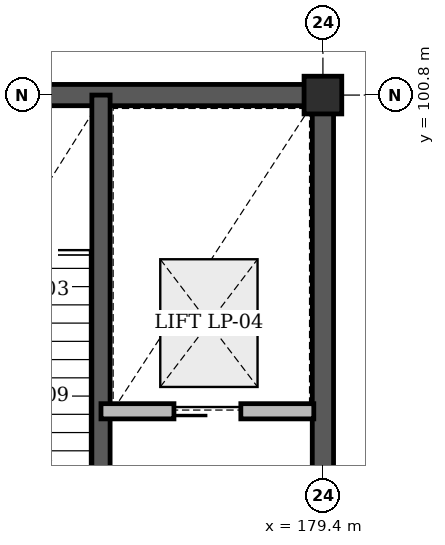
"""IFC4 building model, lengths in metres.
Left out: names, types, materials, properties, quantities, classifications, styles, units other than length and angle.
Written with IfcOpenShell. Run it as: python <this file> out.ifc"""

import sys

from ifc_helpers import new_model, si_unit, direction, frame, frame_2d, origin, origin_2d, place, context, subcontext, project, spatial, rectangle, extrude, element, fill, save


model = new_model("IFC4")
c1 = context("Model", 3, precision=1e-05, world=origin(), true_north=direction((0.0, 1.0)))
c2 = subcontext(c1, "Body", "Model", "MODEL_VIEW")
j1 = project(units=[si_unit("LENGTHUNIT", "METRE"), si_unit("PLANEANGLEUNIT", "RADIAN")], contexts=[c1])
p1 = place(None, origin())
s1 = spatial("IfcSite", under=j1, at=p1, CompositionType="ELEMENT")
p2 = place(p1, origin())
s2 = spatial("IfcBuilding", under=s1, at=p2, CompositionType="ELEMENT")
p3 = place(p2, frame((0.0, 0.0, 9.6)))
s3 = spatial("IfcBuildingStorey", under=s2, at=p3, CompositionType="ELEMENT", Elevation=9.6)
p4 = place(p3, frame((171.425, 100.8, 0.0), z_axis=(0.0, 0.0, 1.0), x_axis=(1.0, 0.0, 0.0)))
e1 = element("IfcWall", 1, at=p4, inside=s3, PredefinedType="SHEAR", context=c2, shape_type="SweptSolid", body=[
    extrude(rectangle(XDim=8.15, YDim=0.35, at=frame_2d((4.075, 0.0))), origin(), (0.0, 0.0, 1.0), 4.48),
])
p5 = place(p3, frame((179.4, 92.4, 0.0), z_axis=(0.0, 0.0, 1.0), x_axis=(0.0, 1.0, 0.0)))
e2 = element("IfcWall", 2, at=p5, inside=s3, PredefinedType="SHEAR", context=c2, shape_type="SweptSolid", body=[
    extrude(rectangle(XDim=8.4, YDim=0.35, at=frame_2d((4.2, 0.0))), origin(), (0.0, 0.0, 1.0), 4.48),
])
p6 = place(p3, frame((179.4, 100.8, 0.0), z_axis=(0.0, 0.0, 1.0), x_axis=(1.0, 0.0, 0.0)))
e3 = element("IfcColumn", 3, at=p6, inside=s3, PredefinedType="COLUMN", context=c2, shape_type="SweptSolid", body=[
    extrude(rectangle(XDim=0.62, YDim=0.62, at=origin_2d()), origin(), (0.0, 0.0, 1.0), 4.8),
])
p7 = place(p3, frame((175.75, 92.4, 0.0), z_axis=(0.0, 0.0, 1.0), x_axis=(0.0, 1.0, 0.0)))
e4 = element("IfcWall", 4, at=p7, inside=s3, PredefinedType="SHEAR", context=c2, shape_type="SweptSolid", body=[
    extrude(rectangle(XDim=8.4, YDim=0.3, at=frame_2d((4.2, 0.0))), origin(), (0.0, 0.0, 1.0), 4.8),
])
p8 = place(p3, frame((175.75, 95.6, 0.0), z_axis=(0.0, 0.0, 1.0), x_axis=(1.0, 0.0, 0.0)))
e5 = element("IfcWall", 5, at=p8, inside=s3, PredefinedType="STANDARD", context=c2, shape_type="SweptSolid", body=[
    extrude(rectangle(XDim=3.5, YDim=0.25, at=frame_2d((1.75, 0.0))), origin(), (0.0, 0.0, 1.0), 4.46),
])
p9 = place(p8, frame((1.2, 0.0, 0.0)))
e6 = element("IfcOpeningElement", 6, at=p9, cuts=e5, PredefinedType="OPENING", context=c2, shape_type="SweptSolid", body=[
    extrude(rectangle(XDim=1.1, YDim=2.2, at=frame_2d((0.55, 1.1))), frame((0.0, 0.135, 0.0), z_axis=(0.0, -1.0, 0.0), x_axis=(1.0, 0.0, 0.0)), (0.0, 0.0, 1.0), 0.27),
])
p10 = place(p9, origin())
e7 = element("IfcDoor", 7, at=p10, inside=s3, OperationType="SLIDING_TO_LEFT", PredefinedType="DOOR", context=c2, shape_type="SweptSolid", body=[
    extrude(rectangle(XDim=1.1, YDim=2.2, at=frame_2d((0.55, 1.1))), frame((0.0, 0.025, 0.0), z_axis=(0.0, -1.0, 0.0), x_axis=(1.0, 0.0, 0.0)), (0.0, 0.0, 1.0), 0.05),
])
fill(e6, e7)
save(model, sys.argv[1])
